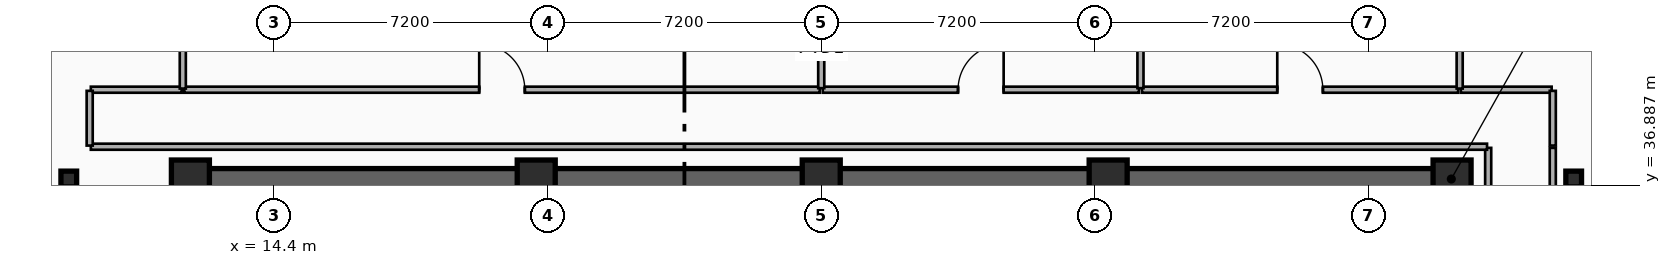
"""IFC4 building model, lengths in metres.
Left out: names, types, materials, properties, quantities, classifications, styles, units other than length and angle.
Written with IfcOpenShell. Run it as: python <this file> out.ifc"""

import sys

from ifc_helpers import new_model, si_unit, direction, frame, frame_2d, origin, origin_2d, place, context, subcontext, project, spatial, rectangle, i_section, extrude, element, fill, save


model = new_model("IFC4")
c1 = context("Model", 3, precision=1e-05, world=origin(), true_north=direction((0.0, 1.0)))
c2 = subcontext(c1, "Body", "Model", "MODEL_VIEW")
j1 = project(units=[si_unit("LENGTHUNIT", "METRE"), si_unit("PLANEANGLEUNIT", "RADIAN")], contexts=[c1])
p1 = place(None, origin())
s1 = spatial("IfcSite", under=j1, at=p1, CompositionType="ELEMENT")
p2 = place(p1, origin())
s2 = spatial("IfcBuilding", under=s1, at=p2, CompositionType="ELEMENT")
p3 = place(p2, frame((0.0, 0.0, 188.4)))
s3 = spatial("IfcBuildingStorey", under=s2, at=p3, CompositionType="ELEMENT", Elevation=188.4)
p4 = place(p3, frame((12.15, 37.05, 0.0), z_axis=(0.0, 0.0, 1.0), x_axis=(1.0, 0.0, 0.0)))
e1 = element("IfcWall", 1, at=p4, inside=s3, PredefinedType="SHEAR", context=c2, shape_type="SweptSolid", body=[
    extrude(rectangle(XDim=33.23, YDim=0.55, at=frame_2d((16.615, 0.0))), origin(), (0.0, 0.0, 1.0), 4.8),
])
for number, where, z_axis, x_axis in (
    (2, (12.2, 37.05, 0.0), (0.0, 0.0, 1.0), (1.0, 0.0, 0.0)),
    (3, (21.3, 37.05, 0.0), (0.0, 0.0, 1.0), (1.0, 0.0, 0.0)),
    (4, (28.8, 37.05, 0.0), (0.0, 0.0, 1.0), (1.0, 0.0, 0.0)),
    (5, (36.35, 37.05, 0.0), (0.0, 0.0, 1.0), (1.0, 0.0, 0.0)),
    (6, (45.4, 37.05, 0.0), (0.0, 0.0, 1.0), (1.0, 0.0, 0.0)),
):
    element("IfcColumn", number, at=place(p3, frame(where, z_axis=z_axis, x_axis=x_axis)), inside=s3, PredefinedType="COLUMN", context=c2, shape_type="SweptSolid", body=[
        extrude(rectangle(XDim=1.0, YDim=1.0, at=origin_2d()), origin(), (0.0, 0.0, 1.0), 4.8),
    ])
for number, where, z_axis, x_axis in (
    (7, (9.0, 37.05, 0.0), (0.0, 0.0, 1.0), (1.0, 0.0, 0.0)),
    (8, (48.6, 37.05, 0.0), (0.0, 0.0, 1.0), (1.0, 0.0, 0.0)),
):
    element("IfcColumn", number, at=place(p3, frame(where, z_axis=z_axis, x_axis=x_axis)), inside=s3, PredefinedType="COLUMN", context=c2, shape_type="SweptSolid", body=[
        extrude(i_section(OverallWidth=0.413, OverallDepth=0.415, WebThickness=0.03, FlangeThickness=0.047, FilletRadius=0.015, at=origin_2d()), origin(), (0.0, 0.0, 1.0), 4.8),
    ])
p5 = place(p3, frame((48.0, 41.62, 0.0), z_axis=(0.0, 0.0, 1.0), x_axis=(0.923870793506, -0.382704529509, 0.0)))
e9 = element("IfcWall", 9, at=p5, inside=s3, PredefinedType="SOLIDWALL", context=c2, shape_type="SweptSolid", body=[
    extrude(rectangle(XDim=3.077, YDim=0.25, at=frame_2d((1.538, 0.0))), origin(), (0.0, 0.0, 1.0), 4.48),
])
p6 = place(p3, frame((6.757, 40.443, 0.0), z_axis=(0.0, 0.0, 1.0), x_axis=(0.923882414032, 0.382676475685, 0.0)))
e10 = element("IfcWall", 10, at=p6, inside=s3, PredefinedType="SOLIDWALL", context=c2, shape_type="SweptSolid", body=[
    extrude(rectangle(XDim=3.077, YDim=0.25, at=frame_2d((1.539, 0.0))), origin(), (0.0, 0.0, 1.0), 4.48),
])
p7 = place(p3, frame((12.04, 39.4, 0.0), z_axis=(0.0, 0.0, 1.0), x_axis=(1.0, 0.0, 0.0)))
e11 = element("IfcWall", 11, at=p7, inside=s3, PredefinedType="PARTITIONING", context=c2, shape_type="SweptSolid", body=[
    extrude(rectangle(XDim=16.72, YDim=0.16, at=frame_2d((8.36, 0.0))), origin(), (0.0, 0.0, 1.0), 4.48),
])
p8 = place(p7, frame((7.76, 0.0, 0.0)))
e12 = element("IfcOpeningElement", 12, at=p8, cuts=e11, PredefinedType="OPENING", context=c2, shape_type="SweptSolid", body=[
    extrude(rectangle(XDim=1.2, YDim=2.15, at=frame_2d((0.6, 1.075))), frame((0.0, 0.09, 0.0), z_axis=(0.0, -1.0, 0.0), x_axis=(1.0, 0.0, 0.0)), (0.0, 0.0, 1.0), 0.18),
])
p9 = place(p3, frame((28.84, 39.4, 0.0), z_axis=(0.0, 0.0, 1.0), x_axis=(1.0, 0.0, 0.0)))
e13 = element("IfcWall", 13, at=p9, inside=s3, PredefinedType="PARTITIONING", context=c2, shape_type="SweptSolid", body=[
    extrude(rectangle(XDim=8.32, YDim=0.16, at=frame_2d((4.16, 0.0))), origin(), (0.0, 0.0, 1.0), 4.48),
])
p10 = place(p9, frame((3.56, 0.0, 0.0)))
e14 = element("IfcOpeningElement", 14, at=p10, cuts=e13, PredefinedType="OPENING", context=c2, shape_type="SweptSolid", body=[
    extrude(rectangle(XDim=1.2, YDim=2.15, at=frame_2d((0.6, 1.075))), frame((0.0, 0.09, 0.0), z_axis=(0.0, -1.0, 0.0), x_axis=(1.0, 0.0, 0.0)), (0.0, 0.0, 1.0), 0.18),
])
p11 = place(p3, frame((37.24, 39.4, 0.0), z_axis=(0.0, 0.0, 1.0), x_axis=(1.0, 0.0, 0.0)))
e15 = element("IfcWall", 15, at=p11, inside=s3, PredefinedType="PARTITIONING", context=c2, shape_type="SweptSolid", body=[
    extrude(rectangle(XDim=8.32, YDim=0.16, at=frame_2d((4.16, 0.0))), origin(), (0.0, 0.0, 1.0), 4.48),
])
p12 = place(p11, frame((3.56, 0.0, 0.0)))
e16 = element("IfcOpeningElement", 16, at=p12, cuts=e15, PredefinedType="OPENING", context=c2, shape_type="SweptSolid", body=[
    extrude(rectangle(XDim=1.2, YDim=2.15, at=frame_2d((0.6, 1.075))), frame((0.0, 0.09, 0.0), z_axis=(0.0, -1.0, 0.0), x_axis=(1.0, 0.0, 0.0)), (0.0, 0.0, 1.0), 0.18),
])
for number, where, z_axis, x_axis in (
    (17, (28.8, 39.44, 0.0), (0.0, 0.0, 1.0), (0.0, 1.0, 0.0)),
    (18, (37.2, 39.44, 0.0), (0.0, 0.0, 1.0), (0.0, 1.0, 0.0)),
):
    element("IfcWall", number, at=place(p3, frame(where, z_axis=z_axis, x_axis=x_axis)), inside=s3, PredefinedType="PARTITIONING", context=c2, shape_type="SweptSolid", body=[
        extrude(rectangle(XDim=2.1, YDim=0.16, at=frame_2d((1.05, 0.0))), origin(), (0.0, 0.0, 1.0), 4.48),
    ])
for number, where, z_axis, x_axis in (
    (19, (46.35, 27.63, 0.0), (0.0, 0.0, 1.0), (0.0, 1.0, 0.0)),
    (20, (48.05, 27.63, 0.0), (0.0, 0.0, 1.0), (0.0, 1.0, 0.0)),
):
    element("IfcWall", number, at=place(p3, frame(where, z_axis=z_axis, x_axis=x_axis)), inside=s3, PredefinedType="PARTITIONING", context=c2, shape_type="SweptSolid", body=[
        extrude(rectangle(XDim=10.24, YDim=0.16, at=frame_2d((5.12, 0.0))), origin(), (0.0, 0.0, 1.0), 3.96),
    ])
p13 = place(p3, frame((9.58, 37.9, 0.0), z_axis=(0.0, 0.0, 1.0), x_axis=(1.0, 0.0, 0.0)))
e21 = element("IfcWall", 21, at=p13, inside=s3, PredefinedType="PARTITIONING", context=c2, shape_type="SweptSolid", body=[
    extrude(rectangle(XDim=36.74, YDim=0.16, at=frame_2d((18.37, 0.0))), origin(), (0.0, 0.0, 1.0), 4.48),
])
p14 = place(p3, frame((9.58, 39.4, 0.0), z_axis=(0.0, 0.0, 1.0), x_axis=(1.0, 0.0, 0.0)))
e22 = element("IfcWall", 22, at=p14, inside=s3, PredefinedType="PARTITIONING", context=c2, shape_type="SweptSolid", body=[
    extrude(rectangle(XDim=2.39, YDim=0.16, at=frame_2d((1.195, 0.0))), origin(), (0.0, 0.0, 1.0), 4.48),
])
p15 = place(p3, frame((45.63, 39.4, 0.0), z_axis=(0.0, 0.0, 1.0), x_axis=(1.0, 0.0, 0.0)))
e23 = element("IfcWall", 23, at=p15, inside=s3, PredefinedType="PARTITIONING", context=c2, shape_type="SweptSolid", body=[
    extrude(rectangle(XDim=2.39, YDim=0.16, at=frame_2d((1.195, 0.0))), origin(), (0.0, 0.0, 1.0), 4.48),
])
for number, where, z_axis, x_axis in (
    (24, (9.55, 37.93, 0.0), (0.0, 0.0, 1.0), (0.0, 1.0, 0.0)),
    (25, (48.05, 37.93, 0.0), (0.0, 0.0, 1.0), (0.0, 1.0, 0.0)),
):
    element("IfcWall", number, at=place(p3, frame(where, z_axis=z_axis, x_axis=x_axis)), inside=s3, PredefinedType="PARTITIONING", context=c2, shape_type="SweptSolid", body=[
        extrude(rectangle(XDim=1.44, YDim=0.16, at=frame_2d((0.72, 0.0))), origin(), (0.0, 0.0, 1.0), 4.48),
    ])
for number, where, z_axis, x_axis in (
    (26, (12.0, 39.43, 0.0), (0.0, 0.0, 1.0), (0.0, 1.0, 0.0)),
    (27, (45.6, 39.43, 0.0), (0.0, 0.0, 1.0), (0.0, 1.0, 0.0)),
):
    element("IfcWall", number, at=place(p3, frame(where, z_axis=z_axis, x_axis=x_axis)), inside=s3, PredefinedType="PARTITIONING", context=c2, shape_type="SweptSolid", body=[
        extrude(rectangle(XDim=2.08, YDim=0.16, at=frame_2d((1.04, 0.0))), origin(), (0.0, 0.0, 1.0), 4.48),
    ])
p16 = place(p8, origin())
e28 = element("IfcDoor", 28, at=p16, inside=s3, OperationType="SINGLE_SWING_LEFT", PredefinedType="DOOR", context=c2, shape_type="SweptSolid", body=[
    extrude(rectangle(XDim=1.2, YDim=2.15, at=frame_2d((0.6, 1.075))), frame((0.0, 0.025, 0.0), z_axis=(0.0, -1.0, 0.0), x_axis=(1.0, 0.0, 0.0)), (0.0, 0.0, 1.0), 0.05),
])
fill(e12, e28)
p17 = place(p10, origin())
e29 = element("IfcDoor", 29, at=p17, inside=s3, OperationType="SINGLE_SWING_RIGHT", PredefinedType="DOOR", context=c2, shape_type="SweptSolid", body=[
    extrude(rectangle(XDim=1.2, YDim=2.15, at=frame_2d((0.6, 1.075))), frame((0.0, 0.025, 0.0), z_axis=(0.0, -1.0, 0.0), x_axis=(1.0, 0.0, 0.0)), (0.0, 0.0, 1.0), 0.05),
])
fill(e14, e29)
p18 = place(p12, origin())
e30 = element("IfcDoor", 30, at=p18, inside=s3, OperationType="SINGLE_SWING_LEFT", PredefinedType="DOOR", context=c2, shape_type="SweptSolid", body=[
    extrude(rectangle(XDim=1.2, YDim=2.15, at=frame_2d((0.6, 1.075))), frame((0.0, 0.025, 0.0), z_axis=(0.0, -1.0, 0.0), x_axis=(1.0, 0.0, 0.0)), (0.0, 0.0, 1.0), 0.05),
])
fill(e16, e30)
save(model, sys.argv[1])
